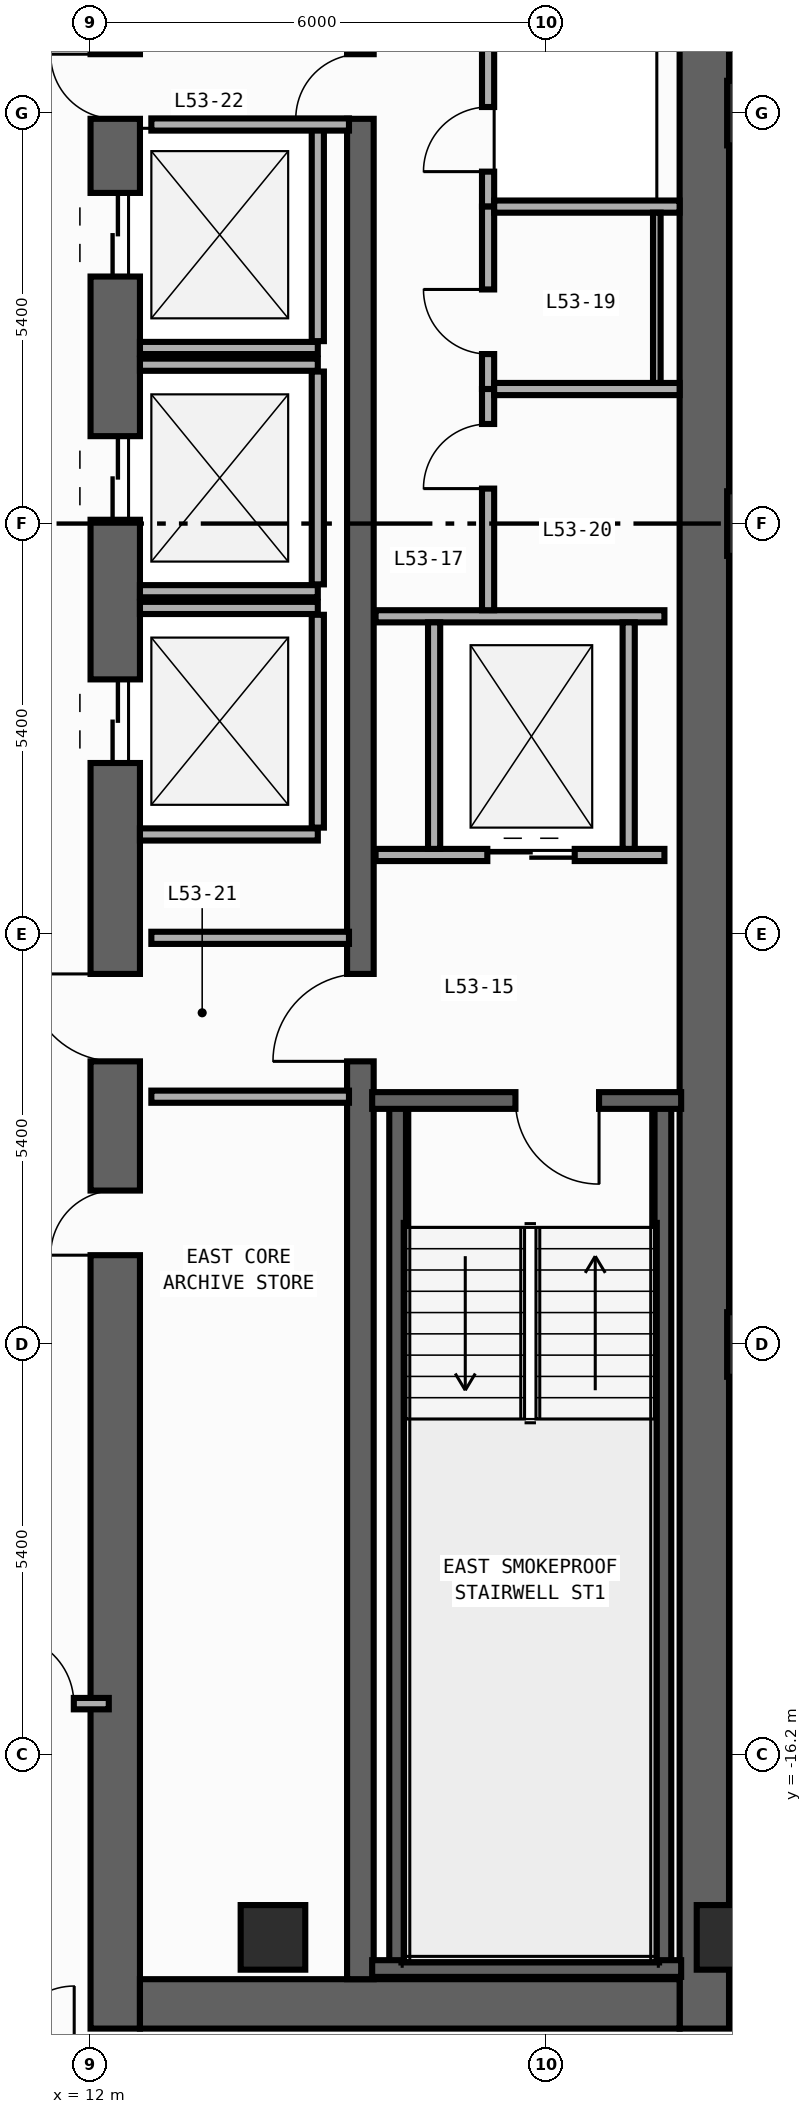
"""IFC4 building model, lengths in metres.
Left out: names, types, materials, properties, quantities, classifications, styles, units other than length and angle.
Written with IfcOpenShell. Run it as: python <this file> out.ifc"""

import sys

from ifc_helpers import new_model, si_unit, direction, frame, frame_2d, origin, origin_2d, place, context, subcontext, project, spatial, rectangle, extrude, element, fill, save


model = new_model("IFC4")
c1 = context("Model", 3, precision=1e-05, world=origin(), true_north=direction((0.0, 1.0)))
c2 = subcontext(c1, "Body", "Model", "MODEL_VIEW")
j1 = project(units=[si_unit("LENGTHUNIT", "METRE"), si_unit("PLANEANGLEUNIT", "RADIAN")], contexts=[c1])
p1 = place(None, origin())
s1 = spatial("IfcSite", under=j1, at=p1, CompositionType="ELEMENT")
p2 = place(p1, origin())
s2 = spatial("IfcBuilding", under=s1, at=p2, CompositionType="ELEMENT")
p3 = place(p2, frame((0.0, 0.0, 229.6)))
s3 = spatial("IfcBuildingStorey", under=s2, at=p3, CompositionType="ELEMENT", Elevation=229.6)
p4 = place(p3, frame((12.325, -19.8, 0.0), z_axis=(0.0, 0.0, 1.0), x_axis=(0.0, 1.0, 0.0)))
e1 = element("IfcWall", 1, at=p4, inside=s3, PredefinedType="SHEAR", context=c2, shape_type="SweptSolid", body=[
    extrude(rectangle(XDim=27.0, YDim=0.65, at=frame_2d((13.5, 0.0))), origin(), (0.0, 0.0, 1.0), 3.34),
])
p5 = place(p4, frame((23.05, 0.0, 0.0)))
e2 = element("IfcOpeningElement", 2, at=p5, cuts=e1, PredefinedType="OPENING", context=c2, shape_type="SweptSolid", body=[
    extrude(rectangle(XDim=1.1, YDim=2.2, at=frame_2d((0.55, 1.1))), frame((0.0, 0.335, 0.0), z_axis=(0.0, -1.0, 0.0), x_axis=(1.0, 0.0, 0.0)), (0.0, 0.0, 1.0), 0.67),
])
p6 = place(p4, frame((19.85, 0.0, 0.0)))
e3 = element("IfcOpeningElement", 3, at=p6, cuts=e1, PredefinedType="OPENING", context=c2, shape_type="SweptSolid", body=[
    extrude(rectangle(XDim=1.1, YDim=2.2, at=frame_2d((0.55, 1.1))), frame((0.0, 0.335, 0.0), z_axis=(0.0, -1.0, 0.0), x_axis=(1.0, 0.0, 0.0)), (0.0, 0.0, 1.0), 0.67),
])
p7 = place(p4, frame((16.65, 0.0, 0.0)))
e4 = element("IfcOpeningElement", 4, at=p7, cuts=e1, PredefinedType="OPENING", context=c2, shape_type="SweptSolid", body=[
    extrude(rectangle(XDim=1.1, YDim=2.2, at=frame_2d((0.55, 1.1))), frame((0.0, 0.335, 0.0), z_axis=(0.0, -1.0, 0.0), x_axis=(1.0, 0.0, 0.0)), (0.0, 0.0, 1.0), 0.67),
])
p8 = place(p4, frame((10.175, 0.0, 0.0)))
e5 = element("IfcOpeningElement", 5, at=p8, cuts=e1, PredefinedType="OPENING", context=c2, shape_type="SweptSolid", body=[
    extrude(rectangle(XDim=0.85, YDim=2.1, at=frame_2d((0.425, 1.05))), frame((0.0, 0.335, 0.0), z_axis=(0.0, -1.0, 0.0), x_axis=(1.0, 0.0, 0.0)), (0.0, 0.0, 1.0), 0.67),
])
p9 = place(p4, frame((12.725, 0.0, 0.0)))
e6 = element("IfcOpeningElement", 6, at=p9, cuts=e1, PredefinedType="OPENING", context=c2, shape_type="SweptSolid", body=[
    extrude(rectangle(XDim=1.15, YDim=2.2, at=frame_2d((0.575, 1.1))), frame((0.0, 0.335, 0.0), z_axis=(0.0, -1.0, 0.0), x_axis=(1.0, 0.0, 0.0)), (0.0, 0.0, 1.0), 0.67),
])
p10 = place(p4, frame((25.125, 0.0, 0.0)))
e7 = element("IfcOpeningElement", 7, at=p10, cuts=e1, PredefinedType="OPENING", context=c2, shape_type="SweptSolid", body=[
    extrude(rectangle(XDim=0.85, YDim=2.1, at=frame_2d((0.425, 1.05))), frame((0.0, 0.335, 0.0), z_axis=(0.0, -1.0, 0.0), x_axis=(1.0, 0.0, 0.0)), (0.0, 0.0, 1.0), 0.67),
])
p11 = place(p3, frame((20.075, -19.8, 0.0), z_axis=(0.0, 0.0, 1.0), x_axis=(0.0, 1.0, 0.0)))
e8 = element("IfcWall", 8, at=p11, inside=s3, PredefinedType="SHEAR", context=c2, shape_type="SweptSolid", body=[
    extrude(rectangle(XDim=27.0, YDim=0.65, at=frame_2d((13.5, 0.0))), origin(), (0.0, 0.0, 1.0), 3.34),
])
p12 = place(p3, frame((12.65, -19.475, 0.0), z_axis=(0.0, 0.0, 1.0), x_axis=(1.0, 0.0, 0.0)))
e9 = element("IfcWall", 9, at=p12, inside=s3, PredefinedType="SHEAR", context=c2, shape_type="SweptSolid", body=[
    extrude(rectangle(XDim=7.1, YDim=0.65, at=frame_2d((3.55, 0.0))), origin(), (0.0, 0.0, 1.0), 3.34),
])
p13 = place(p3, frame((15.55, -19.15, 0.0), z_axis=(0.0, 0.0, 1.0), x_axis=(0.0, 1.0, 0.0)))
e10 = element("IfcWall", 10, at=p13, inside=s3, PredefinedType="SHEAR", context=c2, shape_type="SweptSolid", body=[
    extrude(rectangle(XDim=25.7, YDim=0.35, at=frame_2d((12.85, 0.0))), origin(), (0.0, 0.0, 1.0), 3.34),
])
p14 = place(p13, frame((12.075, 0.0, 0.0)))
e11 = element("IfcOpeningElement", 11, at=p14, cuts=e10, PredefinedType="OPENING", context=c2, shape_type="SweptSolid", body=[
    extrude(rectangle(XDim=1.15, YDim=2.2, at=frame_2d((0.575, 1.1))), frame((0.0, 0.185, 0.0), z_axis=(0.0, -1.0, 0.0), x_axis=(1.0, 0.0, 0.0)), (0.0, 0.0, 1.0), 0.37),
])
p15 = place(p13, frame((24.475, 0.0, 0.0)))
e12 = element("IfcOpeningElement", 12, at=p15, cuts=e10, PredefinedType="OPENING", context=c2, shape_type="SweptSolid", body=[
    extrude(rectangle(XDim=0.85, YDim=2.1, at=frame_2d((0.425, 1.05))), frame((0.0, 0.185, 0.0), z_axis=(0.0, -1.0, 0.0), x_axis=(1.0, 0.0, 0.0)), (0.0, 0.0, 1.0), 0.37),
])
for number, where, z_axis, x_axis in (
    (13, (16.04, -19.01, 0.0), (0.0, 0.0, 1.0), (0.0, 1.0, 0.0)),
    (14, (19.53, -19.01, 0.0), (0.0, 0.0, 1.0), (0.0, 1.0, 0.0)),
):
    element("IfcWall", number, at=place(p3, frame(where, z_axis=z_axis, x_axis=x_axis)), inside=s3, PredefinedType="SHEAR", context=c2, shape_type="SweptSolid", body=[
        extrude(rectangle(XDim=11.42, YDim=0.22, at=frame_2d((5.71, 0.0))), origin(), (0.0, 0.0, 1.0), 3.34),
    ])
p16 = place(p3, frame((15.705, -19.01, 0.0), z_axis=(0.0, 0.0, 1.0), x_axis=(1.0, 0.0, 0.0)))
e15 = element("IfcWall", 15, at=p16, inside=s3, PredefinedType="SHEAR", context=c2, shape_type="SweptSolid", body=[
    extrude(rectangle(XDim=4.065, YDim=0.22, at=frame_2d((2.032, 0.0))), origin(), (0.0, 0.0, 1.0), 3.34),
])
p17 = place(p3, frame((19.77, -7.59, 0.0), z_axis=(0.0, 0.0, 1.0), x_axis=(-1.0, 0.0, 0.0)))
e16 = element("IfcWall", 16, at=p17, inside=s3, PredefinedType="SHEAR", context=c2, shape_type="SweptSolid", body=[
    extrude(rectangle(XDim=4.065, YDim=0.22, at=frame_2d((2.032, 0.0))), origin(), (0.0, 0.0, 1.0), 3.34),
])
p18 = place(p17, frame((1.08, 0.0, 0.0)))
e17 = element("IfcOpeningElement", 17, at=p18, cuts=e16, PredefinedType="OPENING", context=c2, shape_type="SweptSolid", body=[
    extrude(rectangle(XDim=1.1, YDim=2.2, at=frame_2d((0.55, 1.1))), frame((0.0, 0.12, 0.0), z_axis=(0.0, -1.0, 0.0), x_axis=(1.0, 0.0, 0.0)), (0.0, 0.0, 1.0), 0.24),
])
for number, where, z_axis, x_axis in (
    (18, (20.4, -18.6, 0.0), (0.0, 0.0, 1.0), (1.0, 0.0, 0.0)),
    (19, (14.4, -18.6, 0.0), (0.0, 0.0, 1.0), (1.0, 0.0, 0.0)),
    (20, (20.8, -10.8, 0.0), (0.0, 0.0, 1.0), (1.0, 0.0, 0.0)),
    (21, (20.8, 0.0, 0.0), (0.0, 0.0, 1.0), (1.0, 0.0, 0.0)),
    (22, (20.8, 5.4, 0.0), (0.0, 0.0, 1.0), (1.0, 0.0, 0.0)),
):
    element("IfcColumn", number, at=place(p3, frame(where, z_axis=z_axis, x_axis=x_axis)), inside=s3, PredefinedType="COLUMN", context=c2, shape_type="SweptSolid", body=[
        extrude(rectangle(XDim=0.85, YDim=0.85, at=origin_2d()), origin(), (0.0, 0.0, 1.0), 3.6),
    ])
p19 = place(p3, frame((12.65, 2.31, 0.0), z_axis=(0.0, 0.0, 1.0), x_axis=(1.0, 0.0, 0.0)))
e23 = element("IfcWall", 23, at=p19, inside=s3, PredefinedType="STANDARD", context=c2, shape_type="SweptSolid", body=[
    extrude(rectangle(XDim=2.34, YDim=0.16, at=frame_2d((1.17, 0.0))), origin(), (0.0, 0.0, 1.0), 3.34),
])
p20 = place(p3, frame((14.99, 2.4, 0.0), z_axis=(0.0, 0.0, 1.0), x_axis=(0.0, 1.0, 0.0)))
e24 = element("IfcWall", 24, at=p20, inside=s3, PredefinedType="STANDARD", context=c2, shape_type="SweptSolid", body=[
    extrude(rectangle(XDim=2.8, YDim=0.16, at=frame_2d((1.4, 0.0))), origin(), (0.0, 0.0, 1.0), 3.34),
])
for number, where, z_axis, x_axis in (
    (25, (12.65, -0.89, 0.0), (0.0, 0.0, 1.0), (1.0, 0.0, 0.0)),
    (26, (12.65, 2.09, 0.0), (0.0, 0.0, 1.0), (1.0, 0.0, 0.0)),
):
    element("IfcWall", number, at=place(p3, frame(where, z_axis=z_axis, x_axis=x_axis)), inside=s3, PredefinedType="STANDARD", context=c2, shape_type="SweptSolid", body=[
        extrude(rectangle(XDim=2.34, YDim=0.16, at=frame_2d((1.17, 0.0))), origin(), (0.0, 0.0, 1.0), 3.34),
    ])
p21 = place(p3, frame((14.99, -0.8, 0.0), z_axis=(0.0, 0.0, 1.0), x_axis=(0.0, 1.0, 0.0)))
e27 = element("IfcWall", 27, at=p21, inside=s3, PredefinedType="STANDARD", context=c2, shape_type="SweptSolid", body=[
    extrude(rectangle(XDim=2.8, YDim=0.16, at=frame_2d((1.4, 0.0))), origin(), (0.0, 0.0, 1.0), 3.34),
])
for number, where, z_axis, x_axis in (
    (28, (12.65, -4.09, 0.0), (0.0, 0.0, 1.0), (1.0, 0.0, 0.0)),
    (29, (12.65, -1.11, 0.0), (0.0, 0.0, 1.0), (1.0, 0.0, 0.0)),
):
    element("IfcWall", number, at=place(p3, frame(where, z_axis=z_axis, x_axis=x_axis)), inside=s3, PredefinedType="STANDARD", context=c2, shape_type="SweptSolid", body=[
        extrude(rectangle(XDim=2.34, YDim=0.16, at=frame_2d((1.17, 0.0))), origin(), (0.0, 0.0, 1.0), 3.34),
    ])
p22 = place(p3, frame((14.99, -4.0, 0.0), z_axis=(0.0, 0.0, 1.0), x_axis=(0.0, 1.0, 0.0)))
e30 = element("IfcWall", 30, at=p22, inside=s3, PredefinedType="STANDARD", context=c2, shape_type="SweptSolid", body=[
    extrude(rectangle(XDim=2.8, YDim=0.16, at=frame_2d((1.4, 0.0))), origin(), (0.0, 0.0, 1.0), 3.34),
])
p23 = place(p3, frame((15.75, -4.36, 0.0), z_axis=(0.0, 0.0, 1.0), x_axis=(1.0, 0.0, 0.0)))
e31 = element("IfcWall", 31, at=p23, inside=s3, PredefinedType="STANDARD", context=c2, shape_type="SweptSolid", body=[
    extrude(rectangle(XDim=3.8, YDim=0.16, at=frame_2d((1.9, 0.0))), origin(), (0.0, 0.0, 1.0), 3.34),
])
p24 = place(p23, frame((1.47, 0.0, 0.0)))
e32 = element("IfcOpeningElement", 32, at=p24, cuts=e31, PredefinedType="OPENING", context=c2, shape_type="SweptSolid", body=[
    extrude(rectangle(XDim=1.15, YDim=2.2, at=frame_2d((0.575, 1.1))), frame((0.0, 0.09, 0.0), z_axis=(0.0, -1.0, 0.0), x_axis=(1.0, 0.0, 0.0)), (0.0, 0.0, 1.0), 0.18),
])
p25 = place(p3, frame((15.75, -1.22, 0.0), z_axis=(0.0, 0.0, 1.0), x_axis=(1.0, 0.0, 0.0)))
e33 = element("IfcWall", 33, at=p25, inside=s3, PredefinedType="STANDARD", context=c2, shape_type="SweptSolid", body=[
    extrude(rectangle(XDim=3.8, YDim=0.16, at=frame_2d((1.9, 0.0))), origin(), (0.0, 0.0, 1.0), 3.34),
])
for number, where, z_axis, x_axis in (
    (34, (16.52, -4.28, 0.0), (0.0, 0.0, 1.0), (0.0, 1.0, 0.0)),
    (35, (19.08, -4.28, 0.0), (0.0, 0.0, 1.0), (0.0, 1.0, 0.0)),
):
    element("IfcWall", number, at=place(p3, frame(where, z_axis=z_axis, x_axis=x_axis)), inside=s3, PredefinedType="STANDARD", context=c2, shape_type="SweptSolid", body=[
        extrude(rectangle(XDim=2.98, YDim=0.16, at=frame_2d((1.49, 0.0))), origin(), (0.0, 0.0, 1.0), 3.34),
    ])
for number, where, z_axis, x_axis in (
    (36, (12.8, -5.45, 0.0), (0.0, 0.0, 1.0), (1.0, 0.0, 0.0)),
    (37, (12.8, -7.54, 0.0), (0.0, 0.0, 1.0), (1.0, 0.0, 0.0)),
    (38, (12.8, 5.25, 0.0), (0.0, 0.0, 1.0), (1.0, 0.0, 0.0)),
):
    element("IfcWall", number, at=place(p3, frame(where, z_axis=z_axis, x_axis=x_axis)), inside=s3, PredefinedType="STANDARD", context=c2, shape_type="SweptSolid", body=[
        extrude(rectangle(XDim=2.6, YDim=0.16, at=frame_2d((1.3, 0.0))), origin(), (0.0, 0.0, 1.0), 3.34),
    ])
p26 = place(p3, frame((17.23, 4.17, 0.0), z_axis=(0.0, 0.0, 1.0), x_axis=(0.0, 1.0, 0.0)))
e39 = element("IfcWall", 39, at=p26, inside=s3, PredefinedType="PARTITIONING", context=c2, shape_type="SweptSolid", body=[
    extrude(rectangle(XDim=2.38, YDim=0.16, at=frame_2d((1.19, 0.0))), origin(), (0.0, 0.0, 1.0), 3.34),
])
p27 = place(p26, frame((0.46, 0.0, 0.0)))
e40 = element("IfcOpeningElement", 40, at=p27, cuts=e39, PredefinedType="OPENING", context=c2, shape_type="SweptSolid", body=[
    extrude(rectangle(XDim=0.85, YDim=2.1, at=frame_2d((0.425, 1.05))), frame((0.0, 0.09, 0.0), z_axis=(0.0, -1.0, 0.0), x_axis=(1.0, 0.0, 0.0)), (0.0, 0.0, 1.0), 0.18),
])
p28 = place(p3, frame((17.23, 1.77, 0.0), z_axis=(0.0, 0.0, 1.0), x_axis=(0.0, 1.0, 0.0)))
e41 = element("IfcWall", 41, at=p28, inside=s3, PredefinedType="PARTITIONING", context=c2, shape_type="SweptSolid", body=[
    extrude(rectangle(XDim=2.4, YDim=0.16, at=frame_2d((1.2, 0.0))), origin(), (0.0, 0.0, 1.0), 3.34),
])
p29 = place(p28, frame((0.46, 0.0, 0.0)))
e42 = element("IfcOpeningElement", 42, at=p29, cuts=e41, PredefinedType="OPENING", context=c2, shape_type="SweptSolid", body=[
    extrude(rectangle(XDim=0.85, YDim=2.1, at=frame_2d((0.425, 1.05))), frame((0.0, 0.09, 0.0), z_axis=(0.0, -1.0, 0.0), x_axis=(1.0, 0.0, 0.0)), (0.0, 0.0, 1.0), 0.18),
])
p30 = place(p3, frame((17.23, -1.14, 0.0), z_axis=(0.0, 0.0, 1.0), x_axis=(0.0, 1.0, 0.0)))
e43 = element("IfcWall", 43, at=p30, inside=s3, PredefinedType="PARTITIONING", context=c2, shape_type="SweptSolid", body=[
    extrude(rectangle(XDim=2.91, YDim=0.16, at=frame_2d((1.455, 0.0))), origin(), (0.0, 0.0, 1.0), 3.34),
])
p31 = place(p30, frame((1.6, 0.0, 0.0)))
e44 = element("IfcOpeningElement", 44, at=p31, cuts=e43, PredefinedType="OPENING", context=c2, shape_type="SweptSolid", body=[
    extrude(rectangle(XDim=0.85, YDim=2.1, at=frame_2d((0.425, 1.05))), frame((0.0, 0.09, 0.0), z_axis=(0.0, -1.0, 0.0), x_axis=(1.0, 0.0, 0.0)), (0.0, 0.0, 1.0), 0.18),
])
for number, where, z_axis, x_axis in (
    (45, (17.31, 4.17, 0.0), (0.0, 0.0, 1.0), (1.0, 0.0, 0.0)),
    (46, (17.31, 1.77, 0.0), (0.0, 0.0, 1.0), (1.0, 0.0, 0.0)),
):
    element("IfcWall", number, at=place(p3, frame(where, z_axis=z_axis, x_axis=x_axis)), inside=s3, PredefinedType="PARTITIONING", context=c2, shape_type="SweptSolid", body=[
        extrude(rectangle(XDim=2.44, YDim=0.16, at=frame_2d((1.22, 0.0))), origin(), (0.0, 0.0, 1.0), 3.34),
    ])
p32 = place(p3, frame((0.69, -15.525, 0.0), z_axis=(0.0, 0.0, 1.0), x_axis=(1.0, 0.0, 0.0)))
e47 = element("IfcWall", 47, at=p32, inside=s3, PredefinedType="PARTITIONING", context=c2, shape_type="SweptSolid", body=[
    extrude(rectangle(XDim=11.55, YDim=0.15, at=frame_2d((5.775, 0.0))), origin(), (0.0, 0.0, 1.0), 3.34),
])
p33 = place(p32, frame((10.19, 0.0, 0.0)))
e48 = element("IfcOpeningElement", 48, at=p33, cuts=e47, PredefinedType="OPENING", context=c2, shape_type="SweptSolid", body=[
    extrude(rectangle(XDim=0.9, YDim=2.15, at=frame_2d((0.45, 1.075))), frame((0.0, 0.085, 0.0), z_axis=(0.0, -1.0, 0.0), x_axis=(1.0, 0.0, 0.0)), (0.0, 0.0, 1.0), 0.17),
])
p34 = place(p3, frame((19.45, 4.09, 0.0), z_axis=(0.0, 0.0, 1.0), x_axis=(0.0, -1.0, 0.0)))
e49 = element("IfcWall", 49, at=p34, inside=s3, PredefinedType="PARTITIONING", context=c2, shape_type="SweptSolid", body=[
    extrude(rectangle(XDim=2.24, YDim=0.1, at=frame_2d((1.12, 0.0))), origin(), (0.0, 0.0, 1.0), 3.34),
])
p35 = place(p18, origin())
e50 = element("IfcDoor", 50, at=p35, inside=s3, OperationType="SINGLE_SWING_LEFT", PredefinedType="DOOR", context=c2, shape_type="SweptSolid", body=[
    extrude(rectangle(XDim=1.1, YDim=2.2, at=frame_2d((0.55, 1.1))), frame((0.0, 0.025, 0.0), z_axis=(0.0, -1.0, 0.0), x_axis=(1.0, 0.0, 0.0)), (0.0, 0.0, 1.0), 0.05),
])
fill(e17, e50)
p36 = place(p5, origin())
e51 = element("IfcDoor", 51, at=p36, inside=s3, OperationType="DOUBLE_DOOR_SLIDING", PredefinedType="DOOR", context=c2, shape_type="SweptSolid", body=[
    extrude(rectangle(XDim=1.1, YDim=2.2, at=frame_2d((0.55, 1.1))), frame((0.0, 0.025, 0.0), z_axis=(0.0, -1.0, 0.0), x_axis=(1.0, 0.0, 0.0)), (0.0, 0.0, 1.0), 0.05),
])
fill(e2, e51)
p37 = place(p6, origin())
e52 = element("IfcDoor", 52, at=p37, inside=s3, OperationType="DOUBLE_DOOR_SLIDING", PredefinedType="DOOR", context=c2, shape_type="SweptSolid", body=[
    extrude(rectangle(XDim=1.1, YDim=2.2, at=frame_2d((0.55, 1.1))), frame((0.0, 0.025, 0.0), z_axis=(0.0, -1.0, 0.0), x_axis=(1.0, 0.0, 0.0)), (0.0, 0.0, 1.0), 0.05),
])
fill(e3, e52)
p38 = place(p7, origin())
e53 = element("IfcDoor", 53, at=p38, inside=s3, OperationType="DOUBLE_DOOR_SLIDING", PredefinedType="DOOR", context=c2, shape_type="SweptSolid", body=[
    extrude(rectangle(XDim=1.1, YDim=2.2, at=frame_2d((0.55, 1.1))), frame((0.0, 0.025, 0.0), z_axis=(0.0, -1.0, 0.0), x_axis=(1.0, 0.0, 0.0)), (0.0, 0.0, 1.0), 0.05),
])
fill(e4, e53)
p39 = place(p8, origin())
e54 = element("IfcDoor", 54, at=p39, inside=s3, OperationType="SINGLE_SWING_LEFT", PredefinedType="DOOR", context=c2, shape_type="SweptSolid", body=[
    extrude(rectangle(XDim=0.85, YDim=2.1, at=frame_2d((0.425, 1.05))), frame((0.0, 0.025, 0.0), z_axis=(0.0, -1.0, 0.0), x_axis=(1.0, 0.0, 0.0)), (0.0, 0.0, 1.0), 0.05),
])
fill(e5, e54)
p40 = place(p9, origin())
e55 = element("IfcDoor", 55, at=p40, inside=s3, OperationType="SINGLE_SWING_RIGHT", PredefinedType="DOOR", context=c2, shape_type="SweptSolid", body=[
    extrude(rectangle(XDim=1.15, YDim=2.2, at=frame_2d((0.575, 1.1))), frame((0.0, 0.025, 0.0), z_axis=(0.0, -1.0, 0.0), x_axis=(1.0, 0.0, 0.0)), (0.0, 0.0, 1.0), 0.05),
])
fill(e6, e55)
p41 = place(p14, origin())
e56 = element("IfcDoor", 56, at=p41, inside=s3, OperationType="SINGLE_SWING_LEFT", PredefinedType="DOOR", context=c2, shape_type="SweptSolid", body=[
    extrude(rectangle(XDim=1.15, YDim=2.2, at=frame_2d((0.575, 1.1))), frame((0.0, 0.025, 0.0), z_axis=(0.0, -1.0, 0.0), x_axis=(1.0, 0.0, 0.0)), (0.0, 0.0, 1.0), 0.05),
])
fill(e11, e56)
p42 = place(p10, origin())
e57 = element("IfcDoor", 57, at=p42, inside=s3, OperationType="SINGLE_SWING_RIGHT", PredefinedType="DOOR", context=c2, shape_type="SweptSolid", body=[
    extrude(rectangle(XDim=0.85, YDim=2.1, at=frame_2d((0.425, 1.05))), frame((0.0, 0.025, 0.0), z_axis=(0.0, -1.0, 0.0), x_axis=(1.0, 0.0, 0.0)), (0.0, 0.0, 1.0), 0.05),
])
fill(e7, e57)
p43 = place(p15, origin())
e58 = element("IfcDoor", 58, at=p43, inside=s3, OperationType="SINGLE_SWING_LEFT", PredefinedType="DOOR", context=c2, shape_type="SweptSolid", body=[
    extrude(rectangle(XDim=0.85, YDim=2.1, at=frame_2d((0.425, 1.05))), frame((0.0, 0.025, 0.0), z_axis=(0.0, -1.0, 0.0), x_axis=(1.0, 0.0, 0.0)), (0.0, 0.0, 1.0), 0.05),
])
fill(e12, e58)
p44 = place(p24, origin())
e59 = element("IfcDoor", 59, at=p44, inside=s3, OperationType="DOUBLE_DOOR_SLIDING", PredefinedType="DOOR", context=c2, shape_type="SweptSolid", body=[
    extrude(rectangle(XDim=1.15, YDim=2.2, at=frame_2d((0.575, 1.1))), frame((0.0, 0.025, 0.0), z_axis=(0.0, -1.0, 0.0), x_axis=(1.0, 0.0, 0.0)), (0.0, 0.0, 1.0), 0.05),
])
fill(e32, e59)
p45 = place(p27, origin())
e60 = element("IfcDoor", 60, at=p45, inside=s3, OperationType="SINGLE_SWING_LEFT", PredefinedType="DOOR", context=c2, shape_type="SweptSolid", body=[
    extrude(rectangle(XDim=0.85, YDim=2.1, at=frame_2d((0.425, 1.05))), frame((0.0, 0.025, 0.0), z_axis=(0.0, -1.0, 0.0), x_axis=(1.0, 0.0, 0.0)), (0.0, 0.0, 1.0), 0.05),
])
fill(e40, e60)
p46 = place(p29, origin())
e61 = element("IfcDoor", 61, at=p46, inside=s3, OperationType="SINGLE_SWING_RIGHT", PredefinedType="DOOR", context=c2, shape_type="SweptSolid", body=[
    extrude(rectangle(XDim=0.85, YDim=2.1, at=frame_2d((0.425, 1.05))), frame((0.0, 0.025, 0.0), z_axis=(0.0, -1.0, 0.0), x_axis=(1.0, 0.0, 0.0)), (0.0, 0.0, 1.0), 0.05),
])
fill(e42, e61)
p47 = place(p31, origin())
e62 = element("IfcDoor", 62, at=p47, inside=s3, OperationType="SINGLE_SWING_LEFT", PredefinedType="DOOR", context=c2, shape_type="SweptSolid", body=[
    extrude(rectangle(XDim=0.85, YDim=2.1, at=frame_2d((0.425, 1.05))), frame((0.0, 0.025, 0.0), z_axis=(0.0, -1.0, 0.0), x_axis=(1.0, 0.0, 0.0)), (0.0, 0.0, 1.0), 0.05),
])
fill(e44, e62)
p48 = place(p33, origin())
e63 = element("IfcDoor", 63, at=p48, inside=s3, OperationType="SINGLE_SWING_LEFT", PredefinedType="DOOR", context=c2, shape_type="SweptSolid", body=[
    extrude(rectangle(XDim=0.9, YDim=2.15, at=frame_2d((0.45, 1.075))), frame((0.0, 0.025, 0.0), z_axis=(0.0, -1.0, 0.0), x_axis=(1.0, 0.0, 0.0)), (0.0, 0.0, 1.0), 0.05),
])
fill(e48, e63)
save(model, sys.argv[1])
